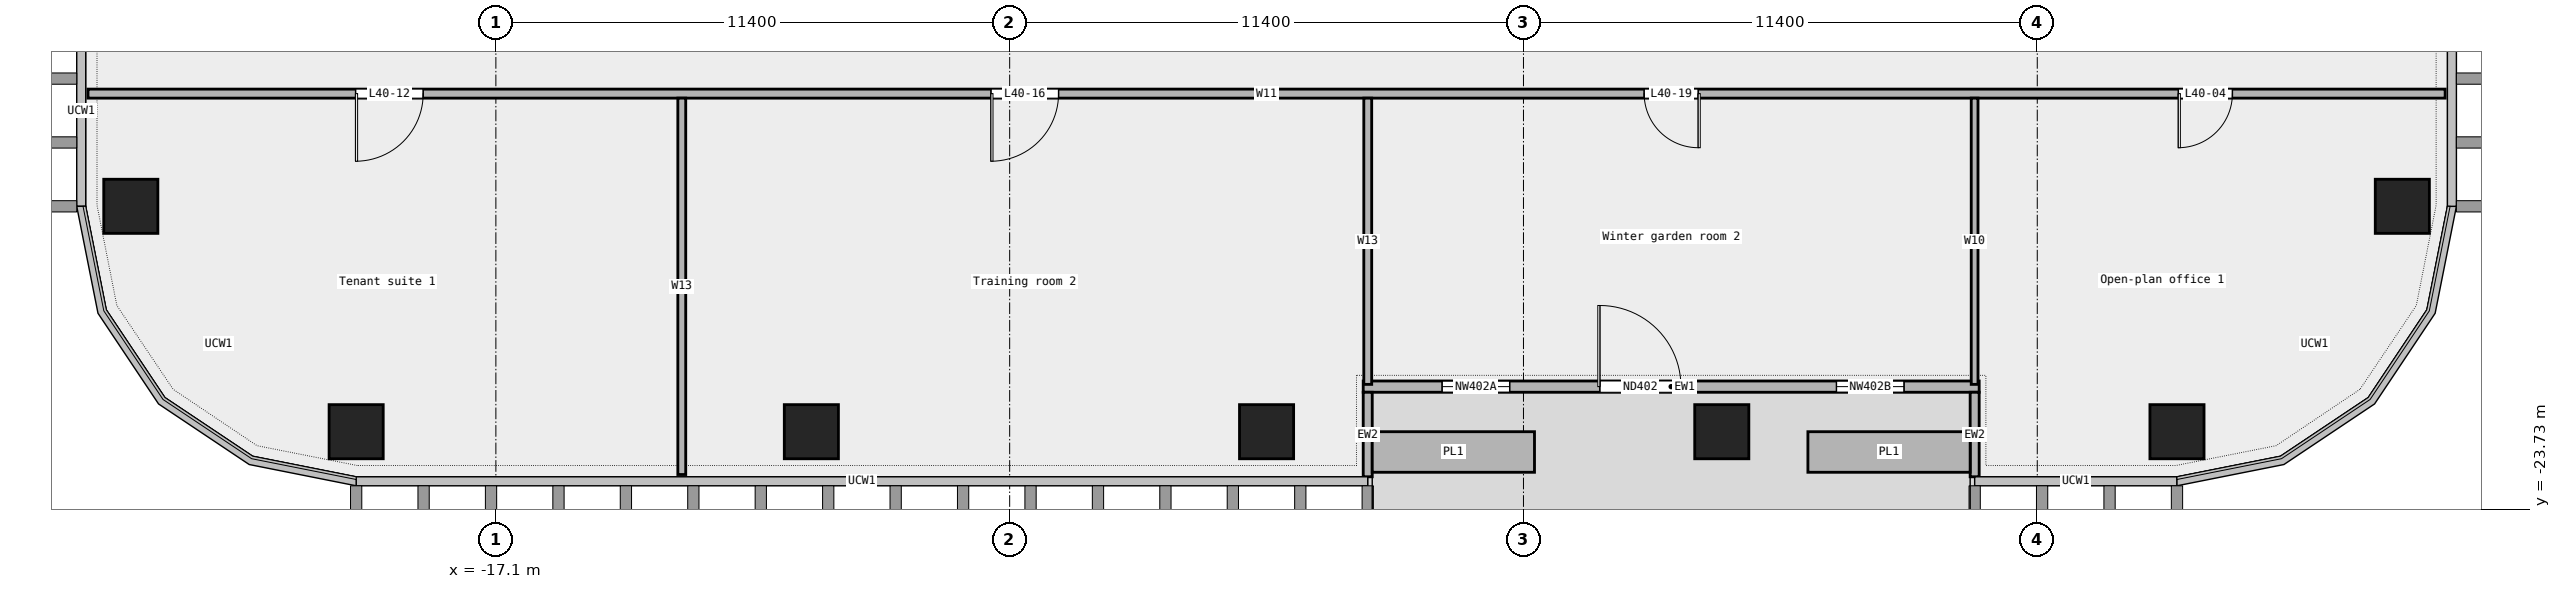
"""IFC4 building model, lengths in metres.
Left out: names, types, materials, properties, quantities, classifications, styles, units other than length and angle.
Written with IfcOpenShell. Run it as: python <this file> out.ifc"""

import sys

from ifc_helpers import new_model, si_unit, direction, frame, frame_2d, origin, origin_2d, place, context, subcontext, project, spatial, rectangle, extrude, element, fill, save


model = new_model("IFC4")
c1 = context("Model", 3, precision=1e-05, world=origin(), true_north=direction((0.0, 1.0)))
c2 = subcontext(c1, "Body", "Model", "MODEL_VIEW")
j1 = project(units=[si_unit("LENGTHUNIT", "METRE"), si_unit("PLANEANGLEUNIT", "RADIAN")], contexts=[c1])
p1 = place(None, origin())
s1 = spatial("IfcSite", under=j1, at=p1, CompositionType="ELEMENT")
p2 = place(p1, origin())
s2 = spatial("IfcBuilding", under=s1, at=p2, CompositionType="ELEMENT")
p3 = place(p2, frame((0.0, 0.0, 193.0)))
s3 = spatial("IfcBuildingStorey", under=s2, at=p3, CompositionType="ELEMENT", Elevation=193.0)
for number, where, z_axis, x_axis in (
    (1, (-20.2, -22.0, 0.0), (0.0, 0.0, 1.0), (1.0, 0.0, 0.0)),
    (2, (-10.1, -22.0, 0.0), (0.0, 0.0, 1.0), (1.0, 0.0, 0.0)),
    (3, (0.0, -22.0, 0.0), (0.0, 0.0, 1.0), (1.0, 0.0, 0.0)),
    (4, (10.1, -22.0, 0.0), (0.0, 0.0, 1.0), (1.0, 0.0, 0.0)),
    (5, (20.2, -22.0, 0.0), (0.0, 0.0, 1.0), (1.0, 0.0, 0.0)),
    (6, (25.2, -17.0, 0.0), (0.0, 0.0, 1.0), (1.0, 0.0, 0.0)),
    (7, (-25.2, -17.0, 0.0), (0.0, 0.0, 1.0), (1.0, 0.0, 0.0)),
):
    element("IfcColumn", number, at=place(p3, frame(where, z_axis=z_axis, x_axis=x_axis)), inside=s3, PredefinedType="COLUMN", context=c2, shape_type="SweptSolid", body=[
        extrude(rectangle(XDim=1.2, YDim=1.2, at=origin_2d()), origin(), (0.0, 0.0, 1.0), 3.6),
    ])
p4 = place(p3, frame((2.145, -21.0, 0.0), z_axis=(0.0, 0.0, 1.0), x_axis=(1.0, 0.0, 0.0)))
e8 = element("IfcWall", 8, at=p4, inside=s3, PredefinedType="STANDARD", context=c2, shape_type="SweptSolid", body=[
    extrude(rectangle(XDim=13.667, YDim=0.25, at=frame_2d((6.833, 0.0))), origin(), (0.0, 0.0, 1.0), 3.6),
])
p5 = place(p4, frame((1.75, 0.0, 0.45)))
e9 = element("IfcOpeningElement", 9, at=p5, cuts=e8, PredefinedType="OPENING", context=c2, shape_type="SweptSolid", body=[
    extrude(rectangle(XDim=1.5, YDim=2.4, at=frame_2d((0.75, 1.2))), frame((0.0, 0.137, 0.0), z_axis=(0.0, -1.0, 0.0), x_axis=(1.0, 0.0, 0.0)), (0.0, 0.0, 1.0), 0.274),
])
p6 = place(p4, frame((5.25, 0.0, 0.0)))
e10 = element("IfcOpeningElement", 10, at=p6, cuts=e8, PredefinedType="OPENING", context=c2, shape_type="SweptSolid", body=[
    extrude(rectangle(XDim=1.8, YDim=2.4, at=frame_2d((0.9, 1.2))), frame((0.0, 0.137, 0.0), z_axis=(0.0, -1.0, 0.0), x_axis=(1.0, 0.0, 0.0)), (0.0, 0.0, 1.0), 0.274),
])
p7 = place(p4, frame((10.5, 0.0, 0.45)))
e11 = element("IfcOpeningElement", 11, at=p7, cuts=e8, PredefinedType="OPENING", context=c2, shape_type="SweptSolid", body=[
    extrude(rectangle(XDim=1.5, YDim=2.4, at=frame_2d((0.75, 1.2))), frame((0.0, 0.137, 0.0), z_axis=(0.0, -1.0, 0.0), x_axis=(1.0, 0.0, 0.0)), (0.0, 0.0, 1.0), 0.274),
])
for number, where, z_axis, x_axis in (
    (12, (2.244, -23.0, 0.0), (0.0, 0.0, 1.0), (0.0, 1.0, 0.0)),
    (13, (15.711, -23.0, 0.0), (0.0, 0.0, 1.0), (0.0, 1.0, 0.0)),
):
    element("IfcWall", number, at=place(p3, frame(where, z_axis=z_axis, x_axis=x_axis)), inside=s3, PredefinedType="STANDARD", context=c2, shape_type="SweptSolid", body=[
        extrude(rectangle(XDim=1.875, YDim=0.2, at=frame_2d((0.938, 0.0))), origin(), (0.0, 0.0, 1.0), 3.6),
    ])
for number, where, z_axis, x_axis in (
    (14, (2.344, -22.45, 0.0), (0.0, 0.0, 1.0), (1.0, 0.0, 0.0)),
    (15, (12.011, -22.45, 0.0), (0.0, 0.0, 1.0), (1.0, 0.0, 0.0)),
):
    element("IfcWall", number, at=place(p3, frame(where, z_axis=z_axis, x_axis=x_axis)), inside=s3, PredefinedType="STANDARD", context=c2, shape_type="SweptSolid", body=[
        extrude(rectangle(XDim=3.6, YDim=0.9, at=frame_2d((1.8, 0.0))), origin(), (0.0, 0.0, 1.0), 0.7),
    ])
p8 = place(p3, frame((-26.15, -14.5, 0.0), z_axis=(0.0, 0.0, 1.0), x_axis=(1.0, 0.0, 0.0)))
e16 = element("IfcWall", 16, at=p8, inside=s3, PredefinedType="PARTITIONING", context=c2, shape_type="SweptSolid", body=[
    extrude(rectangle(XDim=52.3, YDim=0.2, at=frame_2d((26.15, 0.0))), origin(), (0.0, 0.0, 1.0), 3.6),
])
p9 = place(p8, frame((46.38, 0.0, 0.0)))
e17 = element("IfcOpeningElement", 17, at=p9, cuts=e16, PredefinedType="OPENING", context=c2, shape_type="SweptSolid", body=[
    extrude(rectangle(XDim=1.2, YDim=2.1, at=frame_2d((0.6, 1.05))), frame((0.0, 0.112, 0.0), z_axis=(0.0, -1.0, 0.0), x_axis=(1.0, 0.0, 0.0)), (0.0, 0.0, 1.0), 0.224),
])
p10 = place(p8, frame((5.938, 0.0, 0.0)))
e18 = element("IfcOpeningElement", 18, at=p10, cuts=e16, PredefinedType="OPENING", context=c2, shape_type="SweptSolid", body=[
    extrude(rectangle(XDim=1.5, YDim=2.1, at=frame_2d((0.75, 1.05))), frame((0.0, 0.112, 0.0), z_axis=(0.0, -1.0, 0.0), x_axis=(1.0, 0.0, 0.0)), (0.0, 0.0, 1.0), 0.224),
])
p11 = place(p8, frame((20.035, 0.0, 0.0)))
e19 = element("IfcOpeningElement", 19, at=p11, cuts=e16, PredefinedType="OPENING", context=c2, shape_type="SweptSolid", body=[
    extrude(rectangle(XDim=1.5, YDim=2.1, at=frame_2d((0.75, 1.05))), frame((0.0, 0.112, 0.0), z_axis=(0.0, -1.0, 0.0), x_axis=(1.0, 0.0, 0.0)), (0.0, 0.0, 1.0), 0.224),
])
p12 = place(p8, frame((34.528, 0.0, 0.0)))
e20 = element("IfcOpeningElement", 20, at=p12, cuts=e16, PredefinedType="OPENING", context=c2, shape_type="SweptSolid", body=[
    extrude(rectangle(XDim=1.2, YDim=2.1, at=frame_2d((0.6, 1.05))), frame((0.0, 0.112, 0.0), z_axis=(0.0, -1.0, 0.0), x_axis=(1.0, 0.0, 0.0)), (0.0, 0.0, 1.0), 0.224),
])
p13 = place(p3, frame((-12.975, -22.95, 0.0), z_axis=(0.0, 0.0, 1.0), x_axis=(0.0, 1.0, 0.0)))
e21 = element("IfcWall", 21, at=p13, inside=s3, PredefinedType="PARTITIONING", context=c2, shape_type="SweptSolid", body=[
    extrude(rectangle(XDim=8.35, YDim=0.175, at=frame_2d((4.175, 0.0))), origin(), (0.0, 0.0, 1.0), 3.6),
])
p14 = place(p3, frame((2.245, -20.95, 0.0), z_axis=(0.0, 0.0, 1.0), x_axis=(0.0, 1.0, 0.0)))
e22 = element("IfcWall", 22, at=p14, inside=s3, PredefinedType="PARTITIONING", context=c2, shape_type="SweptSolid", body=[
    extrude(rectangle(XDim=6.35, YDim=0.175, at=frame_2d((3.175, 0.0))), origin(), (0.0, 0.0, 1.0), 3.6),
])
p15 = place(p3, frame((15.71, -20.95, 0.0), z_axis=(0.0, 0.0, 1.0), x_axis=(0.0, 1.0, 0.0)))
e23 = element("IfcWall", 23, at=p15, inside=s3, PredefinedType="PARTITIONING", context=c2, shape_type="SweptSolid", body=[
    extrude(rectangle(XDim=6.35, YDim=0.15, at=frame_2d((3.175, 0.0))), origin(), (0.0, 0.0, 1.0), 3.6),
])
p16 = place(p5, origin())
e24 = element("IfcWindow", 24, at=p16, inside=s3, PartitioningType="SINGLE_PANEL", PredefinedType="WINDOW", context=c2, shape_type="SweptSolid", body=[
    extrude(rectangle(XDim=1.5, YDim=2.4, at=frame_2d((0.75, 1.2))), frame((0.0, 0.03, 0.0), z_axis=(0.0, -1.0, 0.0), x_axis=(1.0, 0.0, 0.0)), (0.0, 0.0, 1.0), 0.06),
])
fill(e9, e24)
p17 = place(p6, origin())
e25 = element("IfcDoor", 25, at=p17, inside=s3, OperationType="DOUBLE_DOOR_SINGLE_SWING", PredefinedType="DOOR", context=c2, shape_type="SweptSolid", body=[
    extrude(rectangle(XDim=1.8, YDim=2.4, at=frame_2d((0.9, 1.2))), frame((0.0, 0.025, 0.0), z_axis=(0.0, -1.0, 0.0), x_axis=(1.0, 0.0, 0.0)), (0.0, 0.0, 1.0), 0.05),
])
fill(e10, e25)
p18 = place(p7, origin())
e26 = element("IfcWindow", 26, at=p18, inside=s3, PartitioningType="SINGLE_PANEL", PredefinedType="WINDOW", context=c2, shape_type="SweptSolid", body=[
    extrude(rectangle(XDim=1.5, YDim=2.4, at=frame_2d((0.75, 1.2))), frame((0.0, 0.03, 0.0), z_axis=(0.0, -1.0, 0.0), x_axis=(1.0, 0.0, 0.0)), (0.0, 0.0, 1.0), 0.06),
])
fill(e11, e26)
p19 = place(p9, origin())
e27 = element("IfcDoor", 27, at=p19, inside=s3, OperationType="SINGLE_SWING_RIGHT", PredefinedType="DOOR", context=c2, shape_type="SweptSolid", body=[
    extrude(rectangle(XDim=1.2, YDim=2.1, at=frame_2d((0.6, 1.05))), frame((0.0, 0.025, 0.0), z_axis=(0.0, -1.0, 0.0), x_axis=(1.0, 0.0, 0.0)), (0.0, 0.0, 1.0), 0.05),
])
fill(e17, e27)
p20 = place(p10, origin())
e28 = element("IfcDoor", 28, at=p20, inside=s3, OperationType="DOUBLE_DOOR_SINGLE_SWING", PredefinedType="DOOR", context=c2, shape_type="SweptSolid", body=[
    extrude(rectangle(XDim=1.5, YDim=2.1, at=frame_2d((0.75, 1.05))), frame((0.0, 0.025, 0.0), z_axis=(0.0, -1.0, 0.0), x_axis=(1.0, 0.0, 0.0)), (0.0, 0.0, 1.0), 0.05),
])
fill(e18, e28)
p21 = place(p11, origin())
e29 = element("IfcDoor", 29, at=p21, inside=s3, OperationType="DOUBLE_DOOR_SINGLE_SWING", PredefinedType="DOOR", context=c2, shape_type="SweptSolid", body=[
    extrude(rectangle(XDim=1.5, YDim=2.1, at=frame_2d((0.75, 1.05))), frame((0.0, 0.025, 0.0), z_axis=(0.0, -1.0, 0.0), x_axis=(1.0, 0.0, 0.0)), (0.0, 0.0, 1.0), 0.05),
])
fill(e19, e29)
p22 = place(p12, origin())
e30 = element("IfcDoor", 30, at=p22, inside=s3, OperationType="SINGLE_SWING_LEFT", PredefinedType="DOOR", context=c2, shape_type="SweptSolid", body=[
    extrude(rectangle(XDim=1.2, YDim=2.1, at=frame_2d((0.6, 1.05))), frame((0.0, 0.025, 0.0), z_axis=(0.0, -1.0, 0.0), x_axis=(1.0, 0.0, 0.0)), (0.0, 0.0, 1.0), 0.05),
])
fill(e20, e30)
save(model, sys.argv[1])
